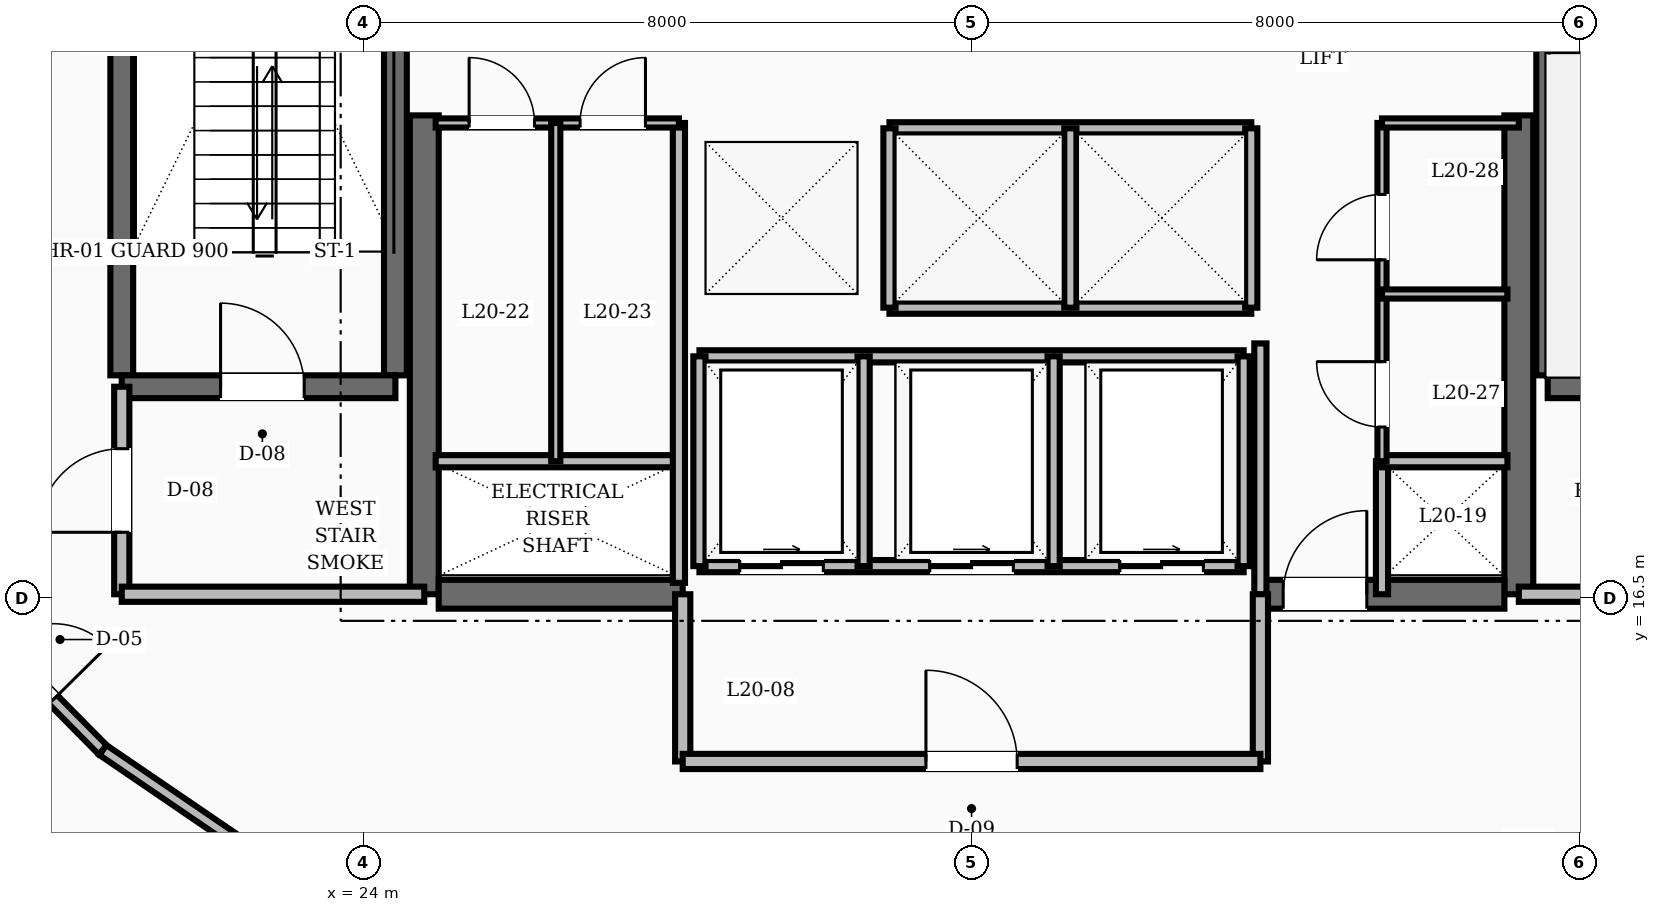
"""IFC4 building model, lengths in metres.
Left out: names, types, materials, properties, quantities, classifications, styles, units other than length and angle.
Written with IfcOpenShell. Run it as: python <this file> out.ifc"""

import sys

from ifc_helpers import new_model, si_unit, direction, frame, frame_2d, origin, place, context, subcontext, project, spatial, rectangle, extrude, element, fill, save


model = new_model("IFC4")
c1 = context("Model", 3, precision=1e-05, world=origin(), true_north=direction((0.0, 1.0)))
c2 = subcontext(c1, "Body", "Model", "MODEL_VIEW")
j1 = project(units=[si_unit("LENGTHUNIT", "METRE"), si_unit("PLANEANGLEUNIT", "RADIAN")], contexts=[c1])
p1 = place(None, origin())
s1 = spatial("IfcSite", under=j1, at=p1, CompositionType="ELEMENT")
p2 = place(p1, origin())
s2 = spatial("IfcBuilding", under=s1, at=p2, CompositionType="ELEMENT")
p3 = place(p2, frame((0.0, 0.0, 80.8)))
s3 = spatial("IfcBuildingStorey", under=s2, at=p3, CompositionType="ELEMENT", Elevation=80.8)
for number, where, z_axis, x_axis in (
    (1, (24.8, 16.55, 0.0), (0.0, 0.0, 1.0), (0.0, 1.0, 0.0)),
    (2, (39.2, 16.55, 0.0), (0.0, 0.0, 1.0), (0.0, 1.0, 0.0)),
):
    element("IfcWall", number, at=place(p3, frame(where, z_axis=z_axis, x_axis=x_axis)), inside=s3, PredefinedType="SHEAR", context=c2, shape_type="SweptSolid", body=[
        extrude(rectangle(XDim=6.3, YDim=0.38, at=frame_2d((3.15, 0.0))), origin(), (0.0, 0.0, 1.0), 3.6),
    ])
p4 = place(p3, frame((24.99, 16.55, 0.0), z_axis=(0.0, 0.0, 1.0), x_axis=(1.0, 0.0, 0.0)))
e3 = element("IfcWall", 3, at=p4, inside=s3, PredefinedType="SHEAR", context=c2, shape_type="SweptSolid", body=[
    extrude(rectangle(XDim=3.21, YDim=0.38, at=frame_2d((1.605, 0.0))), origin(), (0.0, 0.0, 1.0), 3.6),
])
p5 = place(p3, frame((35.8, 16.55, 0.0), z_axis=(0.0, 0.0, 1.0), x_axis=(1.0, 0.0, 0.0)))
e4 = element("IfcWall", 4, at=p5, inside=s3, PredefinedType="SHEAR", context=c2, shape_type="SweptSolid", body=[
    extrude(rectangle(XDim=3.21, YDim=0.38, at=frame_2d((1.605, 0.0))), origin(), (0.0, 0.0, 1.0), 3.6),
])
p6 = place(p5, frame((0.3, 0.0, 0.0)))
e5 = element("IfcOpeningElement", 5, at=p6, cuts=e4, PredefinedType="OPENING", context=c2, shape_type="SweptSolid", body=[
    extrude(rectangle(XDim=1.1, YDim=2.1, at=frame_2d((0.55, 1.05))), frame((0.0, 0.2, 0.0), z_axis=(0.0, -1.0, 0.0), x_axis=(1.0, 0.0, 0.0)), (0.0, 0.0, 1.0), 0.4),
])
for number, where, z_axis, x_axis in (
    (6, (20.82, 19.43, 0.0), (0.0, 0.0, 1.0), (0.0, 1.0, 0.0)),
    (7, (24.42, 19.43, 0.0), (0.0, 0.0, 1.0), (0.0, 1.0, 0.0)),
):
    element("IfcWall", number, at=place(p3, frame(where, z_axis=z_axis, x_axis=x_axis)), inside=s3, PredefinedType="SHEAR", context=c2, shape_type="SweptSolid", body=[
        extrude(rectangle(XDim=8.74, YDim=0.3, at=frame_2d((4.37, 0.0))), origin(), (0.0, 0.0, 1.0), 3.6),
    ])
p7 = place(p3, frame((20.82, 19.28, 0.0), z_axis=(0.0, 0.0, 1.0), x_axis=(1.0, 0.0, 0.0)))
e8 = element("IfcWall", 8, at=p7, inside=s3, PredefinedType="SHEAR", context=c2, shape_type="SweptSolid", body=[
    extrude(rectangle(XDim=3.6, YDim=0.3, at=frame_2d((1.8, 0.0))), origin(), (0.0, 0.0, 1.0), 3.6),
])
p8 = place(p7, frame((1.3, 0.0, 0.0)))
e9 = element("IfcOpeningElement", 9, at=p8, cuts=e8, PredefinedType="OPENING", context=c2, shape_type="SweptSolid", body=[
    extrude(rectangle(XDim=1.1, YDim=2.1, at=frame_2d((0.55, 1.05))), frame((0.0, 0.16, 0.0), z_axis=(0.0, -1.0, 0.0), x_axis=(1.0, 0.0, 0.0)), (0.0, 0.0, 1.0), 0.32),
])
p9 = place(p3, frame((39.58, 19.43, 0.0), z_axis=(0.0, 0.0, 1.0), x_axis=(0.0, 1.0, 0.0)))
e10 = element("IfcWall", 10, at=p9, inside=s3, PredefinedType="SHEAR", context=c2, shape_type="SweptSolid", body=[
    extrude(rectangle(XDim=8.74, YDim=0.3, at=frame_2d((4.37, 0.0))), origin(), (0.0, 0.0, 1.0), 3.6),
])
p10 = place(p3, frame((39.58, 19.28, 0.0), z_axis=(0.0, 0.0, 1.0), x_axis=(1.0, 0.0, 0.0)))
e11 = element("IfcWall", 11, at=p10, inside=s3, PredefinedType="SHEAR", context=c2, shape_type="SweptSolid", body=[
    extrude(rectangle(XDim=3.6, YDim=0.3, at=frame_2d((1.8, 0.0))), origin(), (0.0, 0.0, 1.0), 3.6),
])
p11 = place(p3, frame((20.82, 16.55, 0.0), z_axis=(0.0, 0.0, 1.0), x_axis=(0.0, 1.0, 0.0)))
e12 = element("IfcWall", 12, at=p11, inside=s3, PredefinedType="SOLIDWALL", context=c2, shape_type="SweptSolid", body=[
    extrude(rectangle(XDim=2.73, YDim=0.2, at=frame_2d((1.365, 0.0))), origin(), (0.0, 0.0, 1.0), 2.71),
])
p12 = place(p11, frame((0.815, 0.0, 0.0)))
e13 = element("IfcOpeningElement", 13, at=p12, cuts=e12, PredefinedType="OPENING", context=c2, shape_type="SweptSolid", body=[
    extrude(rectangle(XDim=1.1, YDim=2.1, at=frame_2d((0.55, 1.05))), frame((0.0, 0.11, 0.0), z_axis=(0.0, -1.0, 0.0), x_axis=(1.0, 0.0, 0.0)), (0.0, 0.0, 1.0), 0.22),
])
for number, where, z_axis, x_axis in (
    (14, (20.82, 16.55, 0.0), (0.0, 0.0, 1.0), (1.0, 0.0, 0.0)),
    (15, (39.2, 16.55, 0.0), (0.0, 0.0, 1.0), (1.0, 0.0, 0.0)),
):
    element("IfcWall", number, at=place(p3, frame(where, z_axis=z_axis, x_axis=x_axis)), inside=s3, PredefinedType="SOLIDWALL", context=c2, shape_type="SweptSolid", body=[
        extrude(rectangle(XDim=3.98, YDim=0.2, at=frame_2d((1.99, 0.0))), origin(), (0.0, 0.0, 1.0), 2.71),
    ])
p13 = place(p3, frame((35.8, 16.55, 0.0), z_axis=(0.0, 0.0, 1.0), x_axis=(0.0, 1.0, 0.0)))
e16 = element("IfcWall", 16, at=p13, inside=s3, PredefinedType="SOLIDWALL", context=c2, shape_type="SweptSolid", body=[
    extrude(rectangle(XDim=3.3, YDim=0.16, at=frame_2d((1.65, 0.0))), origin(), (0.0, 0.0, 1.0), 2.71),
])
p14 = place(p3, frame((37.4, 16.55, 0.0), z_axis=(0.0, 0.0, 1.0), x_axis=(0.0, 1.0, 0.0)))
e17 = element("IfcWall", 17, at=p14, inside=s3, PredefinedType="SOLIDWALL", context=c2, shape_type="SweptSolid", body=[
    extrude(rectangle(XDim=1.75, YDim=0.16, at=frame_2d((0.875, 0.0))), origin(), (0.0, 0.0, 1.0), 2.71),
])
for number, where, z_axis, x_axis in (
    (18, (28.2, 14.35, 0.0), (0.0, 0.0, 1.0), (0.0, 1.0, 0.0)),
    (19, (35.8, 14.35, 0.0), (0.0, 0.0, 1.0), (0.0, 1.0, 0.0)),
):
    element("IfcWall", number, at=place(p3, frame(where, z_axis=z_axis, x_axis=x_axis)), inside=s3, PredefinedType="SOLIDWALL", context=c2, shape_type="SweptSolid", body=[
        extrude(rectangle(XDim=2.2, YDim=0.2, at=frame_2d((1.1, 0.0))), origin(), (0.0, 0.0, 1.0), 2.71),
    ])
p15 = place(p3, frame((28.2, 14.35, 0.0), z_axis=(0.0, 0.0, 1.0), x_axis=(1.0, 0.0, 0.0)))
e20 = element("IfcWall", 20, at=p15, inside=s3, PredefinedType="SOLIDWALL", context=c2, shape_type="SweptSolid", body=[
    extrude(rectangle(XDim=7.6, YDim=0.2, at=frame_2d((3.8, 0.0))), origin(), (0.0, 0.0, 1.0), 2.71),
])
p16 = place(p15, frame((3.2, 0.0, 0.0)))
e21 = element("IfcOpeningElement", 21, at=p16, cuts=e20, PredefinedType="OPENING", context=c2, shape_type="SweptSolid", body=[
    extrude(rectangle(XDim=1.2, YDim=2.1, at=frame_2d((0.6, 1.05))), frame((0.0, 0.11, 0.0), z_axis=(0.0, -1.0, 0.0), x_axis=(1.0, 0.0, 0.0)), (0.0, 0.0, 1.0), 0.22),
])
for number, where, z_axis, x_axis in (
    (22, (30.92, 22.68, 0.0), (0.0, 0.0, 1.0), (1.0, 0.0, 0.0)),
    (23, (30.92, 20.32, 0.0), (0.0, 0.0, 1.0), (1.0, 0.0, 0.0)),
):
    element("IfcWall", number, at=place(p3, frame(where, z_axis=z_axis, x_axis=x_axis)), inside=s3, PredefinedType="SOLIDWALL", context=c2, shape_type="SweptSolid", body=[
        extrude(rectangle(XDim=4.76, YDim=0.16, at=frame_2d((2.38, 0.0))), origin(), (0.0, 0.0, 1.0), 2.71),
    ])
for number, where, z_axis, x_axis in (
    (24, (30.92, 20.32, 0.0), (0.0, 0.0, 1.0), (0.0, 1.0, 0.0)),
    (25, (33.3, 20.32, 0.0), (0.0, 0.0, 1.0), (0.0, 1.0, 0.0)),
    (26, (35.68, 20.32, 0.0), (0.0, 0.0, 1.0), (0.0, 1.0, 0.0)),
):
    element("IfcWall", number, at=place(p3, frame(where, z_axis=z_axis, x_axis=x_axis)), inside=s3, PredefinedType="SOLIDWALL", context=c2, shape_type="SweptSolid", body=[
        extrude(rectangle(XDim=2.36, YDim=0.16, at=frame_2d((1.18, 0.0))), origin(), (0.0, 0.0, 1.0), 2.71),
    ])
p17 = place(p3, frame((28.42, 16.92, 0.0), z_axis=(0.0, 0.0, 1.0), x_axis=(1.0, 0.0, 0.0)))
e27 = element("IfcWall", 27, at=p17, inside=s3, PredefinedType="SOLIDWALL", context=c2, shape_type="SweptSolid", body=[
    extrude(rectangle(XDim=7.16, YDim=0.16, at=frame_2d((3.58, 0.0))), origin(), (0.0, 0.0, 1.0), 2.71),
])
p18 = place(p17, frame((0.53, 0.0, 0.0)))
e28 = element("IfcOpeningElement", 28, at=p18, cuts=e27, PredefinedType="OPENING", context=c2, shape_type="SweptSolid", body=[
    extrude(rectangle(XDim=1.1, YDim=2.15, at=frame_2d((0.55, 1.075))), frame((0.0, 0.09, 0.0), z_axis=(0.0, -1.0, 0.0), x_axis=(1.0, 0.0, 0.0)), (0.0, 0.0, 1.0), 0.18),
])
p19 = place(p17, frame((3.03, 0.0, 0.0)))
e29 = element("IfcOpeningElement", 29, at=p19, cuts=e27, PredefinedType="OPENING", context=c2, shape_type="SweptSolid", body=[
    extrude(rectangle(XDim=1.1, YDim=2.15, at=frame_2d((0.55, 1.075))), frame((0.0, 0.09, 0.0), z_axis=(0.0, -1.0, 0.0), x_axis=(1.0, 0.0, 0.0)), (0.0, 0.0, 1.0), 0.18),
])
p20 = place(p17, frame((5.53, 0.0, 0.0)))
e30 = element("IfcOpeningElement", 30, at=p20, cuts=e27, PredefinedType="OPENING", context=c2, shape_type="SweptSolid", body=[
    extrude(rectangle(XDim=1.1, YDim=2.15, at=frame_2d((0.55, 1.075))), frame((0.0, 0.09, 0.0), z_axis=(0.0, -1.0, 0.0), x_axis=(1.0, 0.0, 0.0)), (0.0, 0.0, 1.0), 0.18),
])
p21 = place(p3, frame((28.42, 19.68, 0.0), z_axis=(0.0, 0.0, 1.0), x_axis=(1.0, 0.0, 0.0)))
e31 = element("IfcWall", 31, at=p21, inside=s3, PredefinedType="SOLIDWALL", context=c2, shape_type="SweptSolid", body=[
    extrude(rectangle(XDim=7.16, YDim=0.16, at=frame_2d((3.58, 0.0))), origin(), (0.0, 0.0, 1.0), 2.71),
])
for number, where, z_axis, x_axis in (
    (32, (28.42, 16.92, 0.0), (0.0, 0.0, 1.0), (0.0, 1.0, 0.0)),
    (33, (30.58, 16.92, 0.0), (0.0, 0.0, 1.0), (0.0, 1.0, 0.0)),
    (34, (33.08, 16.92, 0.0), (0.0, 0.0, 1.0), (0.0, 1.0, 0.0)),
    (35, (35.58, 16.92, 0.0), (0.0, 0.0, 1.0), (0.0, 1.0, 0.0)),
):
    element("IfcWall", number, at=place(p3, frame(where, z_axis=z_axis, x_axis=x_axis)), inside=s3, PredefinedType="SOLIDWALL", context=c2, shape_type="SweptSolid", body=[
        extrude(rectangle(XDim=2.76, YDim=0.16, at=frame_2d((1.38, 0.0))), origin(), (0.0, 0.0, 1.0), 2.71),
    ])
p22 = place(p3, frame((24.95, 18.3, 0.0), z_axis=(0.0, 0.0, 1.0), x_axis=(1.0, 0.0, 0.0)))
e36 = element("IfcWall", 36, at=p22, inside=s3, PredefinedType="SOLIDWALL", context=c2, shape_type="SweptSolid", body=[
    extrude(rectangle(XDim=3.2, YDim=0.16, at=frame_2d((1.6, 0.0))), origin(), (0.0, 0.0, 1.0), 2.71),
])
p23 = place(p3, frame((28.15, 16.7, 0.0), z_axis=(0.0, 0.0, 1.0), x_axis=(0.0, 1.0, 0.0)))
e37 = element("IfcWall", 37, at=p23, inside=s3, PredefinedType="SOLIDWALL", context=c2, shape_type="SweptSolid", body=[
    extrude(rectangle(XDim=6.05, YDim=0.16, at=frame_2d((3.025, 0.0))), origin(), (0.0, 0.0, 1.0), 2.71),
])
p24 = place(p3, frame((37.4, 18.3, 0.0), z_axis=(0.0, 0.0, 1.0), x_axis=(1.0, 0.0, 0.0)))
e38 = element("IfcWall", 38, at=p24, inside=s3, PredefinedType="SOLIDWALL", context=c2, shape_type="SweptSolid", body=[
    extrude(rectangle(XDim=1.65, YDim=0.16, at=frame_2d((0.825, 0.0))), origin(), (0.0, 0.0, 1.0), 2.71),
])
p25 = place(p3, frame((24.95, 22.75, 0.0), z_axis=(0.0, 0.0, 1.0), x_axis=(1.0, 0.0, 0.0)))
e39 = element("IfcWall", 39, at=p25, inside=s3, PredefinedType="PARTITIONING", context=c2, shape_type="SweptSolid", body=[
    extrude(rectangle(XDim=3.2, YDim=0.12, at=frame_2d((1.6, 0.0))), origin(), (0.0, 0.0, 1.0), 2.71),
])
p26 = place(p25, frame((0.44, 0.0, 0.0)))
e40 = element("IfcOpeningElement", 40, at=p26, cuts=e39, PredefinedType="OPENING", context=c2, shape_type="SweptSolid", body=[
    extrude(rectangle(XDim=0.86, YDim=2.1, at=frame_2d((0.43, 1.05))), frame((0.0, 0.07, 0.0), z_axis=(0.0, -1.0, 0.0), x_axis=(1.0, 0.0, 0.0)), (0.0, 0.0, 1.0), 0.14),
])
p27 = place(p25, frame((1.9, 0.0, 0.0)))
e41 = element("IfcOpeningElement", 41, at=p27, cuts=e39, PredefinedType="OPENING", context=c2, shape_type="SweptSolid", body=[
    extrude(rectangle(XDim=0.86, YDim=2.1, at=frame_2d((0.43, 1.05))), frame((0.0, 0.07, 0.0), z_axis=(0.0, -1.0, 0.0), x_axis=(1.0, 0.0, 0.0)), (0.0, 0.0, 1.0), 0.14),
])
p28 = place(p3, frame((37.4, 18.3, 0.0), z_axis=(0.0, 0.0, 1.0), x_axis=(0.0, 1.0, 0.0)))
e42 = element("IfcWall", 42, at=p28, inside=s3, PredefinedType="PARTITIONING", context=c2, shape_type="SweptSolid", body=[
    extrude(rectangle(XDim=4.45, YDim=0.12, at=frame_2d((2.225, 0.0))), origin(), (0.0, 0.0, 1.0), 2.71),
])
p29 = place(p28, frame((0.45, 0.0, 0.0)))
e43 = element("IfcOpeningElement", 43, at=p29, cuts=e42, PredefinedType="OPENING", context=c2, shape_type="SweptSolid", body=[
    extrude(rectangle(XDim=0.86, YDim=2.1, at=frame_2d((0.43, 1.05))), frame((0.0, 0.07, 0.0), z_axis=(0.0, -1.0, 0.0), x_axis=(1.0, 0.0, 0.0)), (0.0, 0.0, 1.0), 0.14),
])
p30 = place(p28, frame((2.65, 0.0, 0.0)))
e44 = element("IfcOpeningElement", 44, at=p30, cuts=e42, PredefinedType="OPENING", context=c2, shape_type="SweptSolid", body=[
    extrude(rectangle(XDim=0.86, YDim=2.1, at=frame_2d((0.43, 1.05))), frame((0.0, 0.07, 0.0), z_axis=(0.0, -1.0, 0.0), x_axis=(1.0, 0.0, 0.0)), (0.0, 0.0, 1.0), 0.14),
])
p31 = place(p3, frame((37.4, 22.75, 0.0), z_axis=(0.0, 0.0, 1.0), x_axis=(1.0, 0.0, 0.0)))
e45 = element("IfcWall", 45, at=p31, inside=s3, PredefinedType="PARTITIONING", context=c2, shape_type="SweptSolid", body=[
    extrude(rectangle(XDim=1.8, YDim=0.12, at=frame_2d((0.9, 0.0))), origin(), (0.0, 0.0, 1.0), 2.71),
])
p32 = place(p3, frame((26.53, 18.3, 0.0), z_axis=(0.0, 0.0, 1.0), x_axis=(0.0, 1.0, 0.0)))
e46 = element("IfcWall", 46, at=p32, inside=s3, PredefinedType="PARTITIONING", context=c2, shape_type="SweptSolid", body=[
    extrude(rectangle(XDim=4.45, YDim=0.12, at=frame_2d((2.225, 0.0))), origin(), (0.0, 0.0, 1.0), 2.71),
])
p33 = place(p3, frame((37.4, 20.5, 0.0), z_axis=(0.0, 0.0, 1.0), x_axis=(1.0, 0.0, 0.0)))
e47 = element("IfcWall", 47, at=p33, inside=s3, PredefinedType="PARTITIONING", context=c2, shape_type="SweptSolid", body=[
    extrude(rectangle(XDim=1.65, YDim=0.12, at=frame_2d((0.825, 0.0))), origin(), (0.0, 0.0, 1.0), 2.71),
])
p34 = place(p3, frame((18.562, 16.537, 0.0), z_axis=(0.0, 0.0, 1.0), x_axis=(0.702569520063, -0.711615113301, 0.0)))
e48 = element("IfcWall", 48, at=p34, inside=s3, PredefinedType="SOLIDWALL", context=c2, shape_type="SweptSolid", body=[
    extrude(rectangle(XDim=2.861, YDim=0.16, at=frame_2d((1.43, 0.0))), origin(), (0.0, 0.0, 1.0), 2.71),
])
p35 = place(p34, frame((0.93, 0.0, 0.0)))
e49 = element("IfcOpeningElement", 49, at=p35, cuts=e48, PredefinedType="OPENING", context=c2, shape_type="SweptSolid", body=[
    extrude(rectangle(XDim=1.0, YDim=2.1, at=frame_2d((0.5, 1.05))), frame((0.0, 0.09, 0.0), z_axis=(0.0, -1.0, 0.0), x_axis=(1.0, 0.0, 0.0)), (0.0, 0.0, 1.0), 0.18),
])
p36 = place(p3, frame((20.572, 14.501, 0.0), z_axis=(0.0, 0.0, 1.0), x_axis=(0.826112340767, -0.563505457323, 0.0)))
e50 = element("IfcWall", 50, at=p36, inside=s3, PredefinedType="SOLIDWALL", context=c2, shape_type="SweptSolid", body=[
    extrude(rectangle(XDim=2.965, YDim=0.16, at=frame_2d((1.482, 0.0))), origin(), (0.0, 0.0, 1.0), 2.71),
])
p37 = place(p8, origin())
e51 = element("IfcDoor", 51, at=p37, inside=s3, OperationType="SINGLE_SWING_LEFT", PredefinedType="DOOR", context=c2, shape_type="SweptSolid", body=[
    extrude(rectangle(XDim=1.1, YDim=2.1, at=frame_2d((0.55, 1.05))), frame((0.0, 0.025, 0.0), z_axis=(0.0, -1.0, 0.0), x_axis=(1.0, 0.0, 0.0)), (0.0, 0.0, 1.0), 0.05),
])
fill(e9, e51)
p38 = place(p12, origin())
e52 = element("IfcDoor", 52, at=p38, inside=s3, OperationType="SINGLE_SWING_LEFT", PredefinedType="DOOR", context=c2, shape_type="SweptSolid", body=[
    extrude(rectangle(XDim=1.1, YDim=2.1, at=frame_2d((0.55, 1.05))), frame((0.0, 0.025, 0.0), z_axis=(0.0, -1.0, 0.0), x_axis=(1.0, 0.0, 0.0)), (0.0, 0.0, 1.0), 0.05),
])
fill(e13, e52)
p39 = place(p6, origin())
e53 = element("IfcDoor", 53, at=p39, inside=s3, OperationType="SINGLE_SWING_RIGHT", PredefinedType="DOOR", context=c2, shape_type="SweptSolid", body=[
    extrude(rectangle(XDim=1.1, YDim=2.1, at=frame_2d((0.55, 1.05))), frame((0.0, 0.025, 0.0), z_axis=(0.0, -1.0, 0.0), x_axis=(1.0, 0.0, 0.0)), (0.0, 0.0, 1.0), 0.05),
])
fill(e5, e53)
p40 = place(p16, origin())
e54 = element("IfcDoor", 54, at=p40, inside=s3, OperationType="SINGLE_SWING_LEFT", PredefinedType="DOOR", context=c2, shape_type="SweptSolid", body=[
    extrude(rectangle(XDim=1.2, YDim=2.1, at=frame_2d((0.6, 1.05))), frame((0.0, 0.025, 0.0), z_axis=(0.0, -1.0, 0.0), x_axis=(1.0, 0.0, 0.0)), (0.0, 0.0, 1.0), 0.05),
])
fill(e21, e54)
p41 = place(p18, origin())
e55 = element("IfcDoor", 55, at=p41, inside=s3, OperationType="SLIDING_TO_RIGHT", PredefinedType="DOOR", context=c2, shape_type="SweptSolid", body=[
    extrude(rectangle(XDim=1.1, YDim=2.15, at=frame_2d((0.55, 1.075))), frame((0.0, 0.025, 0.0), z_axis=(0.0, -1.0, 0.0), x_axis=(1.0, 0.0, 0.0)), (0.0, 0.0, 1.0), 0.05),
])
fill(e28, e55)
p42 = place(p19, origin())
e56 = element("IfcDoor", 56, at=p42, inside=s3, OperationType="SLIDING_TO_RIGHT", PredefinedType="DOOR", context=c2, shape_type="SweptSolid", body=[
    extrude(rectangle(XDim=1.1, YDim=2.15, at=frame_2d((0.55, 1.075))), frame((0.0, 0.025, 0.0), z_axis=(0.0, -1.0, 0.0), x_axis=(1.0, 0.0, 0.0)), (0.0, 0.0, 1.0), 0.05),
])
fill(e29, e56)
p43 = place(p20, origin())
e57 = element("IfcDoor", 57, at=p43, inside=s3, OperationType="SLIDING_TO_RIGHT", PredefinedType="DOOR", context=c2, shape_type="SweptSolid", body=[
    extrude(rectangle(XDim=1.1, YDim=2.15, at=frame_2d((0.55, 1.075))), frame((0.0, 0.025, 0.0), z_axis=(0.0, -1.0, 0.0), x_axis=(1.0, 0.0, 0.0)), (0.0, 0.0, 1.0), 0.05),
])
fill(e30, e57)
p44 = place(p26, origin())
e58 = element("IfcDoor", 58, at=p44, inside=s3, OperationType="SINGLE_SWING_LEFT", PredefinedType="DOOR", context=c2, shape_type="SweptSolid", body=[
    extrude(rectangle(XDim=0.86, YDim=2.1, at=frame_2d((0.43, 1.05))), frame((0.0, 0.025, 0.0), z_axis=(0.0, -1.0, 0.0), x_axis=(1.0, 0.0, 0.0)), (0.0, 0.0, 1.0), 0.05),
])
fill(e40, e58)
p45 = place(p27, origin())
e59 = element("IfcDoor", 59, at=p45, inside=s3, OperationType="SINGLE_SWING_RIGHT", PredefinedType="DOOR", context=c2, shape_type="SweptSolid", body=[
    extrude(rectangle(XDim=0.86, YDim=2.1, at=frame_2d((0.43, 1.05))), frame((0.0, 0.025, 0.0), z_axis=(0.0, -1.0, 0.0), x_axis=(1.0, 0.0, 0.0)), (0.0, 0.0, 1.0), 0.05),
])
fill(e41, e59)
p46 = place(p29, origin())
e60 = element("IfcDoor", 60, at=p46, inside=s3, OperationType="SINGLE_SWING_RIGHT", PredefinedType="DOOR", context=c2, shape_type="SweptSolid", body=[
    extrude(rectangle(XDim=0.86, YDim=2.1, at=frame_2d((0.43, 1.05))), frame((0.0, 0.025, 0.0), z_axis=(0.0, -1.0, 0.0), x_axis=(1.0, 0.0, 0.0)), (0.0, 0.0, 1.0), 0.05),
])
fill(e43, e60)
p47 = place(p30, origin())
e61 = element("IfcDoor", 61, at=p47, inside=s3, OperationType="SINGLE_SWING_LEFT", PredefinedType="DOOR", context=c2, shape_type="SweptSolid", body=[
    extrude(rectangle(XDim=0.86, YDim=2.1, at=frame_2d((0.43, 1.05))), frame((0.0, 0.025, 0.0), z_axis=(0.0, -1.0, 0.0), x_axis=(1.0, 0.0, 0.0)), (0.0, 0.0, 1.0), 0.05),
])
fill(e44, e61)
p48 = place(p35, origin())
e62 = element("IfcDoor", 62, at=p48, inside=s3, OperationType="SINGLE_SWING_RIGHT", PredefinedType="DOOR", context=c2, shape_type="SweptSolid", body=[
    extrude(rectangle(XDim=1.0, YDim=2.1, at=frame_2d((0.5, 1.05))), frame((0.0, 0.025, 0.0), z_axis=(0.0, -1.0, 0.0), x_axis=(1.0, 0.0, 0.0)), (0.0, 0.0, 1.0), 0.05),
])
fill(e49, e62)
save(model, sys.argv[1])
